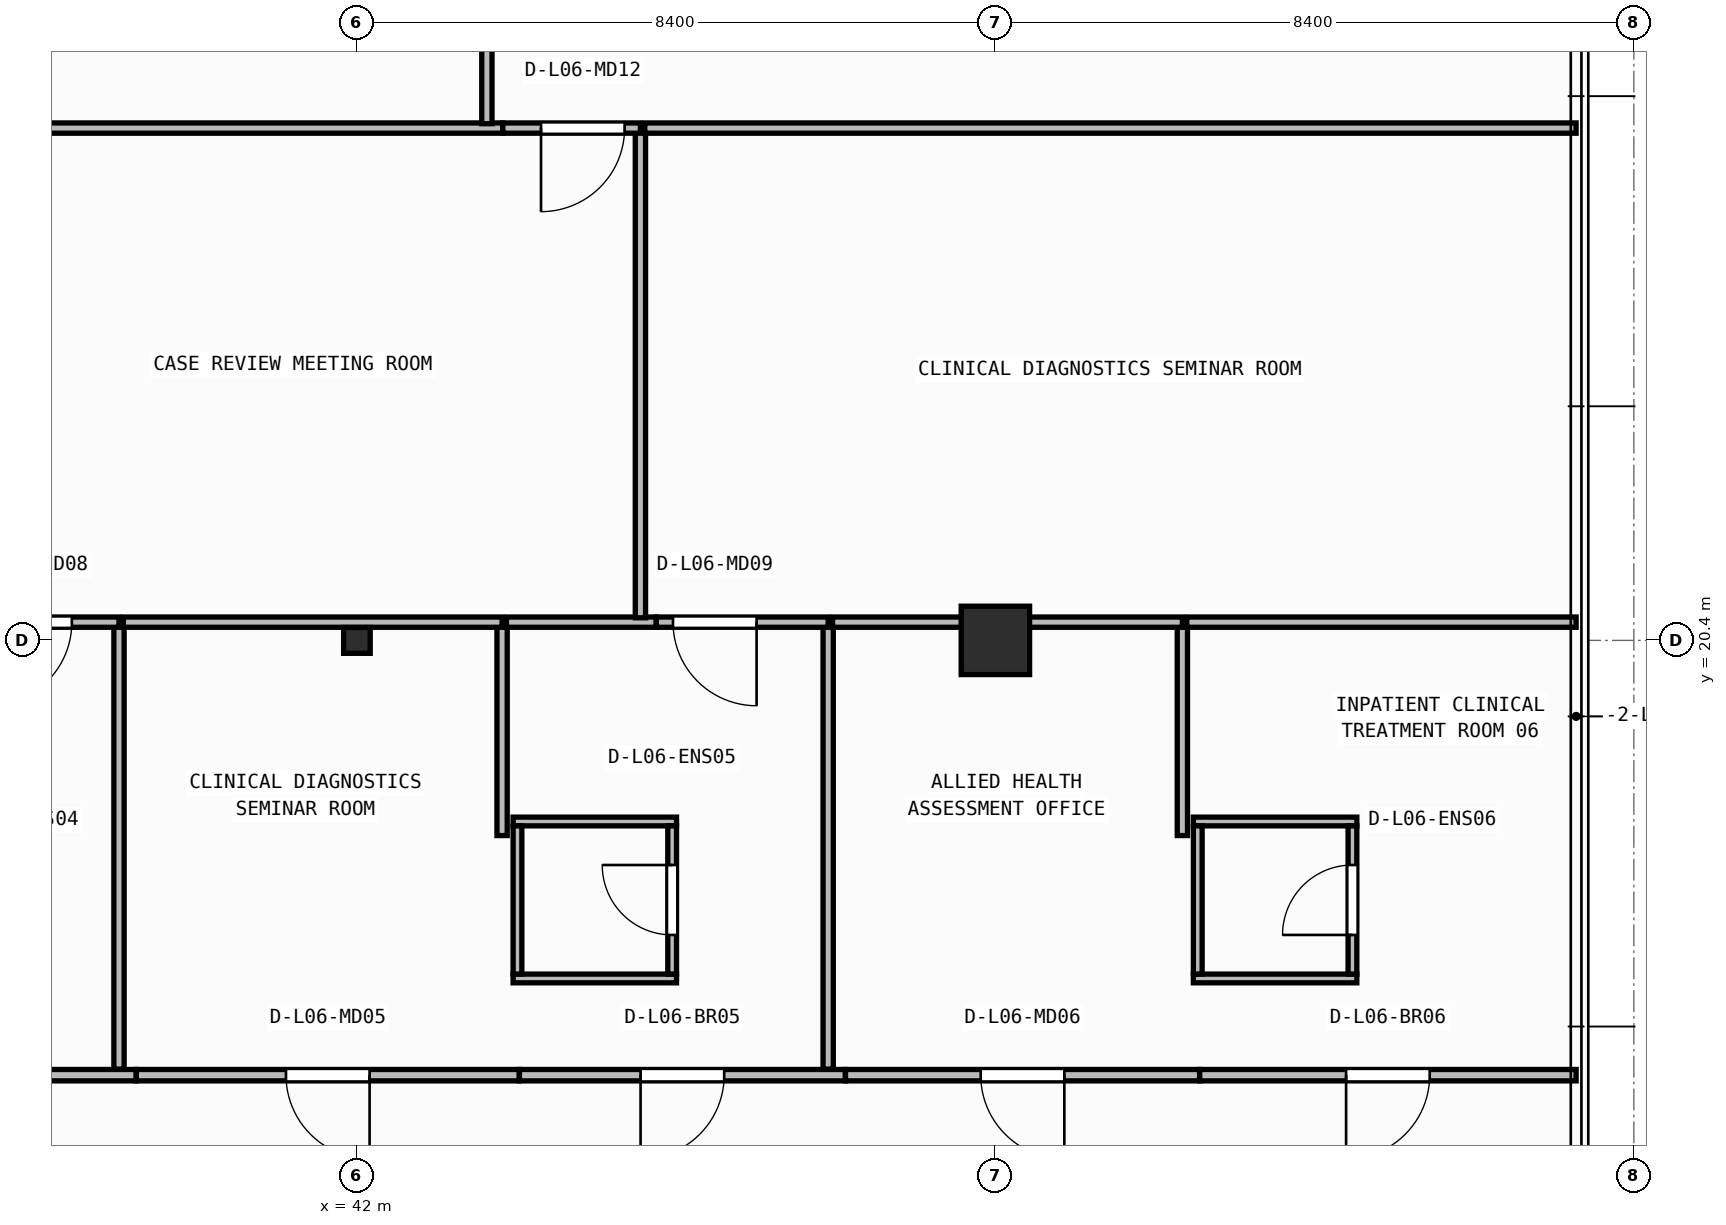
"""IFC4 building model, lengths in metres.
Left out: names, types, materials, properties, quantities, classifications, styles, units other than length and angle.
Written with IfcOpenShell. Run it as: python <this file> out.ifc"""

import sys

from ifc_helpers import new_model, si_unit, direction, frame, frame_2d, origin, origin_2d, place, context, subcontext, project, spatial, rectangle, i_section, extrude, element, fill, save


model = new_model("IFC4")
c1 = context("Model", 3, precision=1e-05, world=origin(), true_north=direction((0.0, 1.0)))
c2 = subcontext(c1, "Body", "Model", "MODEL_VIEW")
j1 = project(units=[si_unit("LENGTHUNIT", "METRE"), si_unit("PLANEANGLEUNIT", "RADIAN")], contexts=[c1])
p1 = place(None, origin())
s1 = spatial("IfcSite", under=j1, at=p1, CompositionType="ELEMENT")
p2 = place(p1, origin())
s2 = spatial("IfcBuilding", under=s1, at=p2, CompositionType="ELEMENT")
p3 = place(p2, frame((0.0, 0.0, 26.45)))
s3 = spatial("IfcBuildingStorey", under=s2, at=p3, CompositionType="ELEMENT", Elevation=26.45)
p4 = place(p3, frame((42.0, 20.4, 0.0), z_axis=(0.0, 0.0, 1.0), x_axis=(1.0, 0.0, 0.0)))
e1 = element("IfcColumn", 1, at=p4, inside=s3, PredefinedType="COLUMN", context=c2, shape_type="SweptSolid", body=[
    extrude(i_section(OverallWidth=0.35, OverallDepth=0.34, WebThickness=0.016, FlangeThickness=0.028, at=origin_2d()), origin(), (0.0, 0.0, 1.0), 3.95),
])
p5 = place(p3, frame((50.4, 20.4, 0.0), z_axis=(0.0, 0.0, 1.0), x_axis=(1.0, 0.0, 0.0)))
e2 = element("IfcColumn", 2, at=p5, inside=s3, PredefinedType="COLUMN", context=c2, shape_type="SweptSolid", body=[
    extrude(rectangle(XDim=0.9, YDim=0.9, at=origin_2d()), origin(), (0.0, 0.0, 1.0), 3.95),
])
p6 = place(p3, frame((44.055, 15.952, 0.0), z_axis=(0.0, 0.0, 1.0), x_axis=(1.0, 0.0, 0.0)))
e3 = element("IfcWall", 3, at=p6, inside=s3, PredefinedType="PARTITIONING", context=c2, shape_type="SweptSolid", body=[
    extrude(rectangle(XDim=2.15, YDim=0.115, at=frame_2d((1.075, 0.0))), origin(), (0.0, 0.0, 1.0), 3.378),
])
p7 = place(p3, frame((44.055, 18.018, 0.0), z_axis=(0.0, 0.0, 1.0), x_axis=(1.0, 0.0, 0.0)))
e4 = element("IfcWall", 4, at=p7, inside=s3, PredefinedType="PARTITIONING", context=c2, shape_type="SweptSolid", body=[
    extrude(rectangle(XDim=2.15, YDim=0.115, at=frame_2d((1.075, 0.0))), origin(), (0.0, 0.0, 1.0), 3.71),
])
p8 = place(p3, frame((44.113, 16.01, 0.0), z_axis=(0.0, 0.0, 1.0), x_axis=(0.0, 1.0, 0.0)))
e5 = element("IfcWall", 5, at=p8, inside=s3, PredefinedType="PARTITIONING", context=c2, shape_type="SweptSolid", body=[
    extrude(rectangle(XDim=1.95, YDim=0.115, at=frame_2d((0.975, 0.0))), origin(), (0.0, 0.0, 1.0), 3.71),
])
p9 = place(p3, frame((46.147, 16.01, 0.0), z_axis=(0.0, 0.0, 1.0), x_axis=(0.0, 1.0, 0.0)))
e6 = element("IfcWall", 6, at=p9, inside=s3, PredefinedType="PARTITIONING", context=c2, shape_type="SweptSolid", body=[
    extrude(rectangle(XDim=1.95, YDim=0.115, at=frame_2d((0.975, 0.0))), origin(), (0.0, 0.0, 1.0), 3.71),
])
p10 = place(p9, frame((0.515, 0.0, 0.0)))
e7 = element("IfcOpeningElement", 7, at=p10, cuts=e6, PredefinedType="OPENING", context=c2, shape_type="SweptSolid", body=[
    extrude(rectangle(XDim=0.92, YDim=2.1, at=frame_2d((0.46, 1.05))), frame((0.0, 0.067, 0.0), z_axis=(0.0, -1.0, 0.0), x_axis=(1.0, 0.0, 0.0)), (0.0, 0.0, 1.0), 0.135),
])
for number, where, z_axis, x_axis in (
    (8, (53.005, 15.952, 0.0), (0.0, 0.0, 1.0), (1.0, 0.0, 0.0)),
    (9, (53.005, 18.018, 0.0), (0.0, 0.0, 1.0), (1.0, 0.0, 0.0)),
):
    element("IfcWall", number, at=place(p3, frame(where, z_axis=z_axis, x_axis=x_axis)), inside=s3, PredefinedType="PARTITIONING", context=c2, shape_type="SweptSolid", body=[
        extrude(rectangle(XDim=2.15, YDim=0.115, at=frame_2d((1.075, 0.0))), origin(), (0.0, 0.0, 1.0), 3.71),
    ])
p11 = place(p3, frame((53.062, 16.01, 0.0), z_axis=(0.0, 0.0, 1.0), x_axis=(0.0, 1.0, 0.0)))
e10 = element("IfcWall", 10, at=p11, inside=s3, PredefinedType="PARTITIONING", context=c2, shape_type="SweptSolid", body=[
    extrude(rectangle(XDim=1.95, YDim=0.115, at=frame_2d((0.975, 0.0))), origin(), (0.0, 0.0, 1.0), 3.71),
])
p12 = place(p3, frame((55.097, 16.01, 0.0), z_axis=(0.0, 0.0, 1.0), x_axis=(0.0, 1.0, 0.0)))
e11 = element("IfcWall", 11, at=p12, inside=s3, PredefinedType="PARTITIONING", context=c2, shape_type="SweptSolid", body=[
    extrude(rectangle(XDim=1.95, YDim=0.115, at=frame_2d((0.975, 0.0))), origin(), (0.0, 0.0, 1.0), 3.71),
])
p13 = place(p12, frame((0.515, 0.0, 0.0)))
e12 = element("IfcOpeningElement", 12, at=p13, cuts=e11, PredefinedType="OPENING", context=c2, shape_type="SweptSolid", body=[
    extrude(rectangle(XDim=0.92, YDim=2.1, at=frame_2d((0.46, 1.05))), frame((0.0, 0.067, 0.0), z_axis=(0.0, -1.0, 0.0), x_axis=(1.0, 0.0, 0.0)), (0.0, 0.0, 1.0), 0.135),
])
p14 = place(p3, frame((39.096, 14.68, 0.0), z_axis=(0.0, 0.0, 1.0), x_axis=(-1.0, 0.0, 0.0)))
e13 = element("IfcWall", 13, at=p14, inside=s3, PredefinedType="PARTITIONING", context=c2, shape_type="SweptSolid", body=[
    extrude(rectangle(XDim=4.658, YDim=0.15, at=frame_2d((2.329, 0.0))), origin(), (0.0, 0.0, 1.0), 3.71),
])
p15 = place(p14, frame((1.779, 0.0, 0.0)))
e14 = element("IfcOpeningElement", 14, at=p15, cuts=e13, PredefinedType="OPENING", context=c2, shape_type="SweptSolid", body=[
    extrude(rectangle(XDim=1.1, YDim=2.1, at=frame_2d((0.55, 1.05))), frame((0.0, 0.085, 0.0), z_axis=(0.0, -1.0, 0.0), x_axis=(1.0, 0.0, 0.0)), (0.0, 0.0, 1.0), 0.17),
])
p16 = place(p3, frame((44.136, 14.68, 0.0), z_axis=(0.0, 0.0, 1.0), x_axis=(-1.0, 0.0, 0.0)))
e15 = element("IfcWall", 15, at=p16, inside=s3, PredefinedType="PARTITIONING", context=c2, shape_type="SweptSolid", body=[
    extrude(rectangle(XDim=5.038, YDim=0.15, at=frame_2d((2.519, 0.0))), origin(), (0.0, 0.0, 1.0), 3.71),
])
p17 = place(p16, frame((1.969, 0.0, 0.0)))
e16 = element("IfcOpeningElement", 16, at=p17, cuts=e15, PredefinedType="OPENING", context=c2, shape_type="SweptSolid", body=[
    extrude(rectangle(XDim=1.1, YDim=2.1, at=frame_2d((0.55, 1.05))), frame((0.0, 0.085, 0.0), z_axis=(0.0, -1.0, 0.0), x_axis=(1.0, 0.0, 0.0)), (0.0, 0.0, 1.0), 0.17),
])
p18 = place(p3, frame((48.426, 14.68, 0.0), z_axis=(0.0, 0.0, 1.0), x_axis=(-1.0, 0.0, 0.0)))
e17 = element("IfcWall", 17, at=p18, inside=s3, PredefinedType="PARTITIONING", context=c2, shape_type="SweptSolid", body=[
    extrude(rectangle(XDim=4.288, YDim=0.15, at=frame_2d((2.144, 0.0))), origin(), (0.0, 0.0, 1.0), 3.71),
])
p19 = place(p18, frame((1.594, 0.0, 0.0)))
e18 = element("IfcOpeningElement", 18, at=p19, cuts=e17, PredefinedType="OPENING", context=c2, shape_type="SweptSolid", body=[
    extrude(rectangle(XDim=1.1, YDim=2.1, at=frame_2d((0.55, 1.05))), frame((0.0, 0.085, 0.0), z_axis=(0.0, -1.0, 0.0), x_axis=(1.0, 0.0, 0.0)), (0.0, 0.0, 1.0), 0.17),
])
p20 = place(p3, frame((53.086, 14.68, 0.0), z_axis=(0.0, 0.0, 1.0), x_axis=(-1.0, 0.0, 0.0)))
e19 = element("IfcWall", 19, at=p20, inside=s3, PredefinedType="PARTITIONING", context=c2, shape_type="SweptSolid", body=[
    extrude(rectangle(XDim=4.658, YDim=0.15, at=frame_2d((2.329, 0.0))), origin(), (0.0, 0.0, 1.0), 3.71),
])
p21 = place(p20, frame((1.779, 0.0, 0.0)))
e20 = element("IfcOpeningElement", 20, at=p21, cuts=e19, PredefinedType="OPENING", context=c2, shape_type="SweptSolid", body=[
    extrude(rectangle(XDim=1.1, YDim=2.1, at=frame_2d((0.55, 1.05))), frame((0.0, 0.085, 0.0), z_axis=(0.0, -1.0, 0.0), x_axis=(1.0, 0.0, 0.0)), (0.0, 0.0, 1.0), 0.17),
])
p22 = place(p3, frame((58.04, 14.68, 0.0), z_axis=(0.0, 0.0, 1.0), x_axis=(-1.0, 0.0, 0.0)))
e21 = element("IfcWall", 21, at=p22, inside=s3, PredefinedType="PARTITIONING", context=c2, shape_type="SweptSolid", body=[
    extrude(rectangle(XDim=4.952, YDim=0.15, at=frame_2d((2.476, 0.0))), origin(), (0.0, 0.0, 1.0), 3.71),
])
p23 = place(p22, frame((1.926, 0.0, 0.0)))
e22 = element("IfcOpeningElement", 22, at=p23, cuts=e21, PredefinedType="OPENING", context=c2, shape_type="SweptSolid", body=[
    extrude(rectangle(XDim=1.1, YDim=2.1, at=frame_2d((0.55, 1.05))), frame((0.0, 0.085, 0.0), z_axis=(0.0, -1.0, 0.0), x_axis=(1.0, 0.0, 0.0)), (0.0, 0.0, 1.0), 0.17),
])
p24 = place(p3, frame((38.87, 14.76, 0.0), z_axis=(0.0, 0.0, 1.0), x_axis=(0.0, 1.0, 0.0)))
e23 = element("IfcWall", 23, at=p24, inside=s3, PredefinedType="PARTITIONING", context=c2, shape_type="SweptSolid", body=[
    extrude(rectangle(XDim=5.88, YDim=0.135, at=frame_2d((2.94, 0.0))), origin(), (0.0, 0.0, 1.0), 3.71),
])
p25 = place(p3, frame((38.87, 20.64, 0.0), z_axis=(0.0, 0.0, 1.0), x_axis=(-1.0, 0.0, 0.0)))
e24 = element("IfcWall", 24, at=p25, inside=s3, PredefinedType="PARTITIONING", context=c2, shape_type="SweptSolid", body=[
    extrude(rectangle(XDim=2.341, YDim=0.135, at=frame_2d((1.17, 0.0))), origin(), (0.0, 0.0, 1.0), 3.073),
])
p26 = place(p25, frame((0.62, 0.0, 0.0)))
e25 = element("IfcOpeningElement", 25, at=p26, cuts=e24, PredefinedType="OPENING", context=c2, shape_type="SweptSolid", body=[
    extrude(rectangle(XDim=1.1, YDim=2.1, at=frame_2d((0.55, 1.05))), frame((0.0, 0.077, 0.0), z_axis=(0.0, -1.0, 0.0), x_axis=(1.0, 0.0, 0.0)), (0.0, 0.0, 1.0), 0.155),
])
p27 = place(p3, frame((43.91, 17.833, 0.0), z_axis=(0.0, 0.0, 1.0), x_axis=(0.0, 1.0, 0.0)))
e26 = element("IfcWall", 26, at=p27, inside=s3, PredefinedType="PARTITIONING", context=c2, shape_type="SweptSolid", body=[
    extrude(rectangle(XDim=2.807, YDim=0.135, at=frame_2d((1.404, 0.0))), origin(), (0.0, 0.0, 1.0), 3.71),
])
p28 = place(p3, frame((43.91, 20.64, 0.0), z_axis=(0.0, 0.0, 1.0), x_axis=(-1.0, 0.0, 0.0)))
e27 = element("IfcWall", 27, at=p28, inside=s3, PredefinedType="PARTITIONING", context=c2, shape_type="SweptSolid", body=[
    extrude(rectangle(XDim=4.982, YDim=0.135, at=frame_2d((2.491, 0.0))), origin(), (0.0, 0.0, 1.0), 3.073),
])
p29 = place(p3, frame((48.2, 14.76, 0.0), z_axis=(0.0, 0.0, 1.0), x_axis=(0.0, 1.0, 0.0)))
e28 = element("IfcWall", 28, at=p29, inside=s3, PredefinedType="PARTITIONING", context=c2, shape_type="SweptSolid", body=[
    extrude(rectangle(XDim=5.88, YDim=0.135, at=frame_2d((2.94, 0.0))), origin(), (0.0, 0.0, 1.0), 3.71),
])
p30 = place(p3, frame((45.938, 20.64, 0.0), z_axis=(0.0, 0.0, 1.0), x_axis=(-1.0, 0.0, 0.0)))
e29 = element("IfcWall", 29, at=p30, inside=s3, PredefinedType="PARTITIONING", context=c2, shape_type="SweptSolid", body=[
    extrude(rectangle(XDim=1.97, YDim=0.135, at=frame_2d((0.985, 0.0))), origin(), (0.0, 0.0, 1.0), 3.073),
])
p31 = place(p3, frame((48.2, 20.64, 0.0), z_axis=(0.0, 0.0, 1.0), x_axis=(-1.0, 0.0, 0.0)))
e30 = element("IfcWall", 30, at=p31, inside=s3, PredefinedType="PARTITIONING", context=c2, shape_type="SweptSolid", body=[
    extrude(rectangle(XDim=2.26, YDim=0.135, at=frame_2d((1.13, 0.0))), origin(), (0.0, 0.0, 1.0), 3.073),
])
p32 = place(p31, frame((0.941, 0.0, 0.0)))
e31 = element("IfcOpeningElement", 31, at=p32, cuts=e30, PredefinedType="OPENING", context=c2, shape_type="SweptSolid", body=[
    extrude(rectangle(XDim=1.1, YDim=2.1, at=frame_2d((0.55, 1.05))), frame((0.0, 0.077, 0.0), z_axis=(0.0, -1.0, 0.0), x_axis=(1.0, 0.0, 0.0)), (0.0, 0.0, 1.0), 0.155),
])
p33 = place(p3, frame((52.86, 17.833, 0.0), z_axis=(0.0, 0.0, 1.0), x_axis=(0.0, 1.0, 0.0)))
e32 = element("IfcWall", 32, at=p33, inside=s3, PredefinedType="PARTITIONING", context=c2, shape_type="SweptSolid", body=[
    extrude(rectangle(XDim=2.807, YDim=0.135, at=frame_2d((1.404, 0.0))), origin(), (0.0, 0.0, 1.0), 3.71),
])
p34 = place(p3, frame((52.86, 20.64, 0.0), z_axis=(0.0, 0.0, 1.0), x_axis=(-1.0, 0.0, 0.0)))
e33 = element("IfcWall", 33, at=p34, inside=s3, PredefinedType="PARTITIONING", context=c2, shape_type="SweptSolid", body=[
    extrude(rectangle(XDim=4.603, YDim=0.135, at=frame_2d((2.301, 0.0))), origin(), (0.0, 0.0, 1.0), 3.073),
])
p35 = place(p3, frame((58.04, 20.64, 0.0), z_axis=(0.0, 0.0, 1.0), x_axis=(-1.0, 0.0, 0.0)))
e34 = element("IfcWall", 34, at=p35, inside=s3, PredefinedType="PARTITIONING", context=c2, shape_type="SweptSolid", body=[
    extrude(rectangle(XDim=5.123, YDim=0.135, at=frame_2d((2.561, 0.0))), origin(), (0.0, 0.0, 1.0), 3.71),
])
p36 = place(p3, frame((45.73, 20.698, 0.0), z_axis=(0.0, 0.0, 1.0), x_axis=(0.0, 1.0, 0.0)))
e35 = element("IfcWall", 35, at=p36, inside=s3, PredefinedType="PARTITIONING", context=c2, shape_type="SweptSolid", body=[
    extrude(rectangle(XDim=6.442, YDim=0.135, at=frame_2d((3.221, 0.0))), origin(), (0.0, 0.0, 1.0), 3.71),
])
p37 = place(p3, frame((43.917, 27.14, 0.0), z_axis=(0.0, 0.0, 1.0), x_axis=(-1.0, 0.0, 0.0)))
e36 = element("IfcWall", 36, at=p37, inside=s3, PredefinedType="PARTITIONING", context=c2, shape_type="SweptSolid", body=[
    extrude(rectangle(XDim=7.54, YDim=0.135, at=frame_2d((3.77, 0.0))), origin(), (0.0, 0.0, 1.0), 3.71),
])
p38 = place(p3, frame((45.73, 27.14, 0.0), z_axis=(0.0, 0.0, 1.0), x_axis=(-1.0, 0.0, 0.0)))
e37 = element("IfcWall", 37, at=p38, inside=s3, PredefinedType="PARTITIONING", context=c2, shape_type="SweptSolid", body=[
    extrude(rectangle(XDim=1.811, YDim=0.135, at=frame_2d((0.905, 0.0))), origin(), (0.0, 0.0, 1.0), 3.71),
])
p39 = place(p38, frame((0.208, 0.0, 0.0)))
e38 = element("IfcOpeningElement", 38, at=p39, cuts=e37, PredefinedType="OPENING", context=c2, shape_type="SweptSolid", body=[
    extrude(rectangle(XDim=1.1, YDim=2.1, at=frame_2d((0.55, 1.05))), frame((0.0, 0.077, 0.0), z_axis=(0.0, -1.0, 0.0), x_axis=(1.0, 0.0, 0.0)), (0.0, 0.0, 1.0), 0.155),
])
p40 = place(p3, frame((58.04, 27.14, 0.0), z_axis=(0.0, 0.0, 1.0), x_axis=(-1.0, 0.0, 0.0)))
e39 = element("IfcWall", 39, at=p40, inside=s3, PredefinedType="PARTITIONING", context=c2, shape_type="SweptSolid", body=[
    extrude(rectangle(XDim=12.252, YDim=0.135, at=frame_2d((6.126, 0.0))), origin(), (0.0, 0.0, 1.0), 3.71),
])
p41 = place(p3, frame((43.71, 27.198, 0.0), z_axis=(0.0, 0.0, 1.0), x_axis=(0.0, 1.0, 0.0)))
e40 = element("IfcWall", 40, at=p41, inside=s3, PredefinedType="PARTITIONING", context=c2, shape_type="SweptSolid", body=[
    extrude(rectangle(XDim=4.891, YDim=0.135, at=frame_2d((2.445, 0.0))), origin(), (0.0, 0.0, 1.0), 3.71),
])
p42 = place(p10, origin())
e41 = element("IfcDoor", 41, at=p42, inside=s3, OperationType="SINGLE_SWING_RIGHT", PredefinedType="DOOR", context=c2, shape_type="SweptSolid", body=[
    extrude(rectangle(XDim=0.92, YDim=2.1, at=frame_2d((0.46, 1.05))), frame((0.0, 0.025, 0.0), z_axis=(0.0, -1.0, 0.0), x_axis=(1.0, 0.0, 0.0)), (0.0, 0.0, 1.0), 0.05),
])
fill(e7, e41)
p43 = place(p13, origin())
e42 = element("IfcDoor", 42, at=p43, inside=s3, OperationType="SINGLE_SWING_LEFT", PredefinedType="DOOR", context=c2, shape_type="SweptSolid", body=[
    extrude(rectangle(XDim=0.92, YDim=2.1, at=frame_2d((0.46, 1.05))), frame((0.0, 0.025, 0.0), z_axis=(0.0, -1.0, 0.0), x_axis=(1.0, 0.0, 0.0)), (0.0, 0.0, 1.0), 0.05),
])
fill(e12, e42)
p44 = place(p17, origin())
e43 = element("IfcDoor", 43, at=p44, inside=s3, OperationType="SINGLE_SWING_LEFT", PredefinedType="DOOR", context=c2, shape_type="SweptSolid", body=[
    extrude(rectangle(XDim=1.1, YDim=2.1, at=frame_2d((0.55, 1.05))), frame((0.0, 0.025, 0.0), z_axis=(0.0, -1.0, 0.0), x_axis=(1.0, 0.0, 0.0)), (0.0, 0.0, 1.0), 0.05),
])
fill(e16, e43)
p45 = place(p19, origin())
e44 = element("IfcDoor", 44, at=p45, inside=s3, OperationType="SINGLE_SWING_RIGHT", PredefinedType="DOOR", context=c2, shape_type="SweptSolid", body=[
    extrude(rectangle(XDim=1.1, YDim=2.1, at=frame_2d((0.55, 1.05))), frame((0.0, 0.025, 0.0), z_axis=(0.0, -1.0, 0.0), x_axis=(1.0, 0.0, 0.0)), (0.0, 0.0, 1.0), 0.05),
])
fill(e18, e44)
p46 = place(p21, origin())
e45 = element("IfcDoor", 45, at=p46, inside=s3, OperationType="SINGLE_SWING_LEFT", PredefinedType="DOOR", context=c2, shape_type="SweptSolid", body=[
    extrude(rectangle(XDim=1.1, YDim=2.1, at=frame_2d((0.55, 1.05))), frame((0.0, 0.025, 0.0), z_axis=(0.0, -1.0, 0.0), x_axis=(1.0, 0.0, 0.0)), (0.0, 0.0, 1.0), 0.05),
])
fill(e20, e45)
p47 = place(p23, origin())
e46 = element("IfcDoor", 46, at=p47, inside=s3, OperationType="SINGLE_SWING_RIGHT", PredefinedType="DOOR", context=c2, shape_type="SweptSolid", body=[
    extrude(rectangle(XDim=1.1, YDim=2.1, at=frame_2d((0.55, 1.05))), frame((0.0, 0.025, 0.0), z_axis=(0.0, -1.0, 0.0), x_axis=(1.0, 0.0, 0.0)), (0.0, 0.0, 1.0), 0.05),
])
fill(e22, e46)
p48 = place(p26, origin())
e47 = element("IfcDoor", 47, at=p48, inside=s3, OperationType="SINGLE_SWING_RIGHT", PredefinedType="DOOR", context=c2, shape_type="SweptSolid", body=[
    extrude(rectangle(XDim=1.1, YDim=2.1, at=frame_2d((0.55, 1.05))), frame((0.0, 0.025, 0.0), z_axis=(0.0, -1.0, 0.0), x_axis=(1.0, 0.0, 0.0)), (0.0, 0.0, 1.0), 0.05),
])
fill(e25, e47)
p49 = place(p32, origin())
e48 = element("IfcDoor", 48, at=p49, inside=s3, OperationType="SINGLE_SWING_LEFT", PredefinedType="DOOR", context=c2, shape_type="SweptSolid", body=[
    extrude(rectangle(XDim=1.1, YDim=2.1, at=frame_2d((0.55, 1.05))), frame((0.0, 0.025, 0.0), z_axis=(0.0, -1.0, 0.0), x_axis=(1.0, 0.0, 0.0)), (0.0, 0.0, 1.0), 0.05),
])
fill(e31, e48)
p50 = place(p39, origin())
e49 = element("IfcDoor", 49, at=p50, inside=s3, OperationType="SINGLE_SWING_RIGHT", PredefinedType="DOOR", context=c2, shape_type="SweptSolid", body=[
    extrude(rectangle(XDim=1.1, YDim=2.1, at=frame_2d((0.55, 1.05))), frame((0.0, 0.025, 0.0), z_axis=(0.0, -1.0, 0.0), x_axis=(1.0, 0.0, 0.0)), (0.0, 0.0, 1.0), 0.05),
])
fill(e38, e49)
save(model, sys.argv[1])
